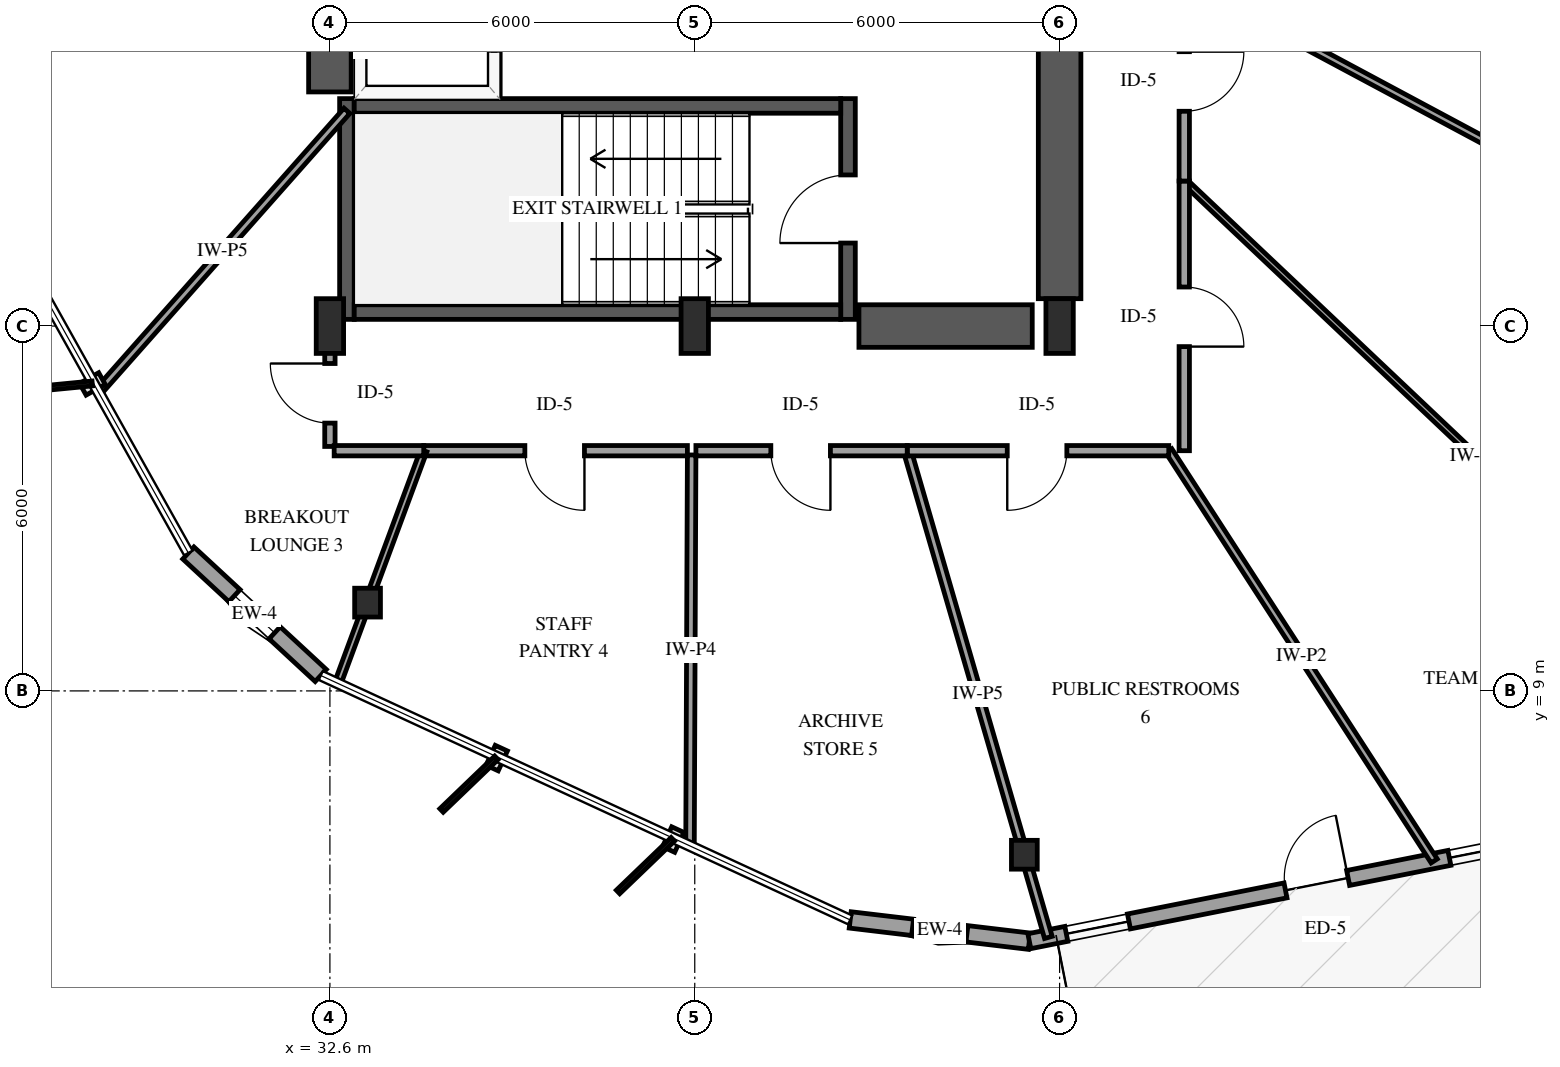
"""IFC4 building model, lengths in metres.
Left out: names, types, materials, properties, quantities, classifications, styles, units other than length and angle.
Written with IfcOpenShell. Run it as: python <this file> out.ifc"""

import sys

from ifc_helpers import new_model, si_unit, direction, frame, frame_2d, origin, origin_2d, place, context, subcontext, project, spatial, rectangle, i_section, extrude, element, fill, save


model = new_model("IFC4")
c1 = context("Model", 3, precision=1e-05, world=origin(), true_north=direction((0.0, 1.0)))
c2 = subcontext(c1, "Body", "Model", "MODEL_VIEW")
j1 = project(units=[si_unit("LENGTHUNIT", "METRE"), si_unit("PLANEANGLEUNIT", "RADIAN")], contexts=[c1])
p1 = place(None, origin())
s1 = spatial("IfcSite", under=j1, at=p1, CompositionType="ELEMENT")
p2 = place(p1, origin())
s2 = spatial("IfcBuilding", under=s1, at=p2, CompositionType="ELEMENT")
p3 = place(p2, frame((0.0, 0.0, 70.6)))
s3 = spatial("IfcBuildingStorey", under=s2, at=p3, CompositionType="ELEMENT", Elevation=70.6)
p4 = place(p3, frame((32.88, 15.11, 0.0), z_axis=(0.0, 0.0, 1.0), x_axis=(0.0, 1.0, 0.0)))
e1 = element("IfcWall", 1, at=p4, inside=s3, PredefinedType="SHEAR", context=c2, shape_type="SweptSolid", body=[
    extrude(rectangle(XDim=3.63, YDim=0.24, at=frame_2d((1.815, 0.0))), origin(), (0.0, 0.0, 1.0), 4.0),
])
p5 = place(p3, frame((41.12, 15.11, 0.0), z_axis=(0.0, 0.0, 1.0), x_axis=(0.0, 1.0, 0.0)))
e2 = element("IfcWall", 2, at=p5, inside=s3, PredefinedType="SHEAR", context=c2, shape_type="SweptSolid", body=[
    extrude(rectangle(XDim=3.63, YDim=0.24, at=frame_2d((1.815, 0.0))), origin(), (0.0, 0.0, 1.0), 4.0),
])
p6 = place(p5, frame((1.255, 0.0, 0.0)))
e3 = element("IfcOpeningElement", 3, at=p6, cuts=e2, PredefinedType="OPENING", context=c2, shape_type="SweptSolid", body=[
    extrude(rectangle(XDim=1.12, YDim=2.15, at=frame_2d((0.56, 1.075))), frame((0.0, 0.13, 0.0), z_axis=(0.0, -1.0, 0.0), x_axis=(1.0, 0.0, 0.0)), (0.0, 0.0, 1.0), 0.26),
])
for number, where, z_axis, x_axis in (
    (4, (33.0, 15.23, 0.0), (0.0, 0.0, 1.0), (1.0, 0.0, 0.0)),
    (5, (33.0, 18.62, 0.0), (0.0, 0.0, 1.0), (1.0, 0.0, 0.0)),
):
    element("IfcWall", number, at=place(p3, frame(where, z_axis=z_axis, x_axis=x_axis)), inside=s3, PredefinedType="SHEAR", context=c2, shape_type="SweptSolid", body=[
        extrude(rectangle(XDim=8.0, YDim=0.24, at=frame_2d((4.0, 0.0))), origin(), (0.0, 0.0, 1.0), 4.0),
    ])
p7 = place(p3, frame((32.6, 18.85, 0.0), z_axis=(0.0, 0.0, 1.0), x_axis=(0.0, 1.0, 0.0)))
e6 = element("IfcWall", 6, at=p7, inside=s3, PredefinedType="SHEAR", context=c2, shape_type="SweptSolid", body=[
    extrude(rectangle(XDim=12.3, YDim=0.7, at=frame_2d((6.15, 0.0))), origin(), (0.0, 0.0, 1.0), 4.0),
])
p8 = place(p3, frame((41.3, 15.0, 0.0), z_axis=(0.0, 0.0, 1.0), x_axis=(1.0, 0.0, 0.0)))
e7 = element("IfcWall", 7, at=p8, inside=s3, PredefinedType="SHEAR", context=c2, shape_type="SweptSolid", body=[
    extrude(rectangle(XDim=2.85, YDim=0.7, at=frame_2d((1.425, 0.0))), origin(), (0.0, 0.0, 1.0), 4.0),
])
p9 = place(p3, frame((44.6, 15.45, 0.0), z_axis=(0.0, 0.0, 1.0), x_axis=(0.0, 1.0, 0.0)))
e8 = element("IfcWall", 8, at=p9, inside=s3, PredefinedType="SHEAR", context=c2, shape_type="SweptSolid", body=[
    extrude(rectangle(XDim=6.35, YDim=0.7, at=frame_2d((3.175, 0.0))), origin(), (0.0, 0.0, 1.0), 4.0),
])
for number, where, z_axis, x_axis in (
    (9, (32.6, 15.0, 0.0), (0.0, 0.0, 1.0), (1.0, 0.0, 0.0)),
    (10, (38.6, 15.0, 0.0), (0.0, 0.0, 1.0), (1.0, 0.0, 0.0)),
    (11, (44.6, 15.0, 0.0), (0.0, 0.0, 1.0), (1.0, 0.0, 0.0)),
):
    element("IfcColumn", number, at=place(p3, frame(where, z_axis=z_axis, x_axis=x_axis)), inside=s3, PredefinedType="PILASTER", context=c2, shape_type="SweptSolid", body=[
        extrude(rectangle(XDim=0.45, YDim=0.9, at=origin_2d()), origin(), (0.0, 0.0, 1.0), 4.0),
    ])
for number, where, z_axis, x_axis in (
    (12, (33.219, 10.452, 0.0), (0.0, 0.0, 1.0), (1.0, 0.0, 0.0)),
    (13, (44.02, 6.306, 0.0), (0.0, 0.0, 1.0), (1.0, 0.0, 0.0)),
):
    element("IfcColumn", number, at=place(p3, frame(where, z_axis=z_axis, x_axis=x_axis)), inside=s3, PredefinedType="COLUMN", context=c2, shape_type="SweptSolid", body=[
        extrude(i_section(OverallWidth=0.424, OverallDepth=0.474, WebThickness=0.048, FlangeThickness=0.077, FilletRadius=0.038, at=origin_2d()), origin(), (0.0, 0.0, 1.0), 4.0),
    ])
p10 = place(p3, frame((30.272, 11.268, 0.0), z_axis=(0.0, 0.0, 1.0), x_axis=(0.733979438108, -0.679171689954, 0.0)))
e14 = element("IfcWall", 14, at=p10, inside=s3, PredefinedType="SOLIDWALL", context=c2, shape_type="SweptSolid", body=[
    extrude(rectangle(XDim=2.967, YDim=0.27, at=frame_2d((1.483, 0.0))), origin(), (0.0, 0.0, 1.0), 3.079),
])
p11 = place(p10, frame((1.033, 0.0, 0.75)))
e15 = element("IfcOpeningElement", 15, at=p11, cuts=e14, PredefinedType="OPENING", context=c2, shape_type="SweptSolid", body=[
    extrude(rectangle(XDim=0.9, YDim=1.5, at=frame_2d((0.45, 0.75))), frame((0.0, 0.145, 0.0), z_axis=(0.0, -1.0, 0.0), x_axis=(1.0, 0.0, 0.0)), (0.0, 0.0, 1.0), 0.29),
])
p12 = place(p3, frame((41.156, 5.234, 0.0), z_axis=(0.0, 0.0, 1.0), x_axis=(0.993011715875, -0.118015813075, 0.0)))
e16 = element("IfcWall", 16, at=p12, inside=s3, PredefinedType="SOLIDWALL", context=c2, shape_type="SweptSolid", body=[
    extrude(rectangle(XDim=2.967, YDim=0.27, at=frame_2d((1.483, 0.0))), origin(), (0.0, 0.0, 1.0), 3.079),
])
p13 = place(p12, frame((1.033, 0.0, 0.75)))
e17 = element("IfcOpeningElement", 17, at=p13, cuts=e16, PredefinedType="OPENING", context=c2, shape_type="SweptSolid", body=[
    extrude(rectangle(XDim=0.9, YDim=1.5, at=frame_2d((0.45, 0.75))), frame((0.0, 0.145, 0.0), z_axis=(0.0, -1.0, 0.0), x_axis=(1.0, 0.0, 0.0)), (0.0, 0.0, 1.0), 0.29),
])
p14 = place(p3, frame((44.102, 4.884, 0.0), z_axis=(0.0, 0.0, 1.0), x_axis=(0.980886929862, 0.194578598067, 0.0)))
e18 = element("IfcWall", 18, at=p14, inside=s3, PredefinedType="SOLIDWALL", context=c2, shape_type="SweptSolid", body=[
    extrude(rectangle(XDim=9.59, YDim=0.25, at=frame_2d((4.795, 0.0))), origin(), (0.0, 0.0, 1.0), 3.079),
])
p15 = place(p14, frame((4.295, 0.0, 0.0)))
e19 = element("IfcOpeningElement", 19, at=p15, cuts=e18, PredefinedType="OPENING", context=c2, shape_type="SweptSolid", body=[
    extrude(rectangle(XDim=1.05, YDim=2.15, at=frame_2d((0.525, 1.075))), frame((0.0, 0.135, 0.0), z_axis=(0.0, -1.0, 0.0), x_axis=(1.0, 0.0, 0.0)), (0.0, 0.0, 1.0), 0.27),
])
p16 = place(p14, frame((0.62, 0.0, 0.72)))
e20 = element("IfcOpeningElement", 20, at=p16, cuts=e18, PredefinedType="OPENING", context=c2, shape_type="SweptSolid", body=[
    extrude(rectangle(XDim=1.05, YDim=1.55, at=frame_2d((0.525, 0.775))), frame((0.0, 0.135, 0.0), z_axis=(0.0, -1.0, 0.0), x_axis=(1.0, 0.0, 0.0)), (0.0, 0.0, 1.0), 0.27),
])
p17 = place(p14, frame((7.042, 0.0, 0.72)))
e21 = element("IfcOpeningElement", 21, at=p17, cuts=e18, PredefinedType="OPENING", context=c2, shape_type="SweptSolid", body=[
    extrude(rectangle(XDim=1.05, YDim=1.55, at=frame_2d((0.525, 0.775))), frame((0.0, 0.135, 0.0), z_axis=(0.0, -1.0, 0.0), x_axis=(1.0, 0.0, 0.0)), (0.0, 0.0, 1.0), 0.27),
])
p18 = place(p3, frame((35.3, 18.79, 0.0), z_axis=(0.0, 0.0, 1.0), x_axis=(0.0, 1.0, 0.0)))
e22 = element("IfcWall", 22, at=p18, inside=s3, PredefinedType="SOLIDWALL", context=c2, shape_type="SweptSolid", body=[
    extrude(rectangle(XDim=2.55, YDim=0.2, at=frame_2d((1.275, 0.0))), origin(), (0.0, 0.0, 1.0), 3.7),
])
p19 = place(p18, frame((0.725, 0.0, 0.0)))
e23 = element("IfcOpeningElement", 23, at=p19, cuts=e22, PredefinedType="OPENING", context=c2, shape_type="SweptSolid", body=[
    extrude(rectangle(XDim=1.1, YDim=2.15, at=frame_2d((0.55, 1.075))), frame((0.0, 0.11, 0.0), z_axis=(0.0, -1.0, 0.0), x_axis=(1.0, 0.0, 0.0)), (0.0, 0.0, 1.0), 0.22),
])
p20 = place(p3, frame((46.65, 22.738, 0.0), z_axis=(0.0, 0.0, 1.0), x_axis=(0.96273671491, -0.270440414443, 0.0)))
e24 = element("IfcWall", 24, at=p20, inside=s3, PredefinedType="PARTITIONING", context=c2, shape_type="SweptSolid", body=[
    extrude(rectangle(XDim=17.864, YDim=0.14, at=frame_2d((8.932, 0.0))), origin(), (0.0, 0.0, 1.0), 2.995),
])
p21 = place(p3, frame((46.65, 20.689, 0.0), z_axis=(0.0, 0.0, 1.0), x_axis=(0.881590875685, -0.472014330194, 0.0)))
e25 = element("IfcWall", 25, at=p21, inside=s3, PredefinedType="PARTITIONING", context=c2, shape_type="SweptSolid", body=[
    extrude(rectangle(XDim=15.934, YDim=0.12, at=frame_2d((7.967, 0.0))), origin(), (0.0, 0.0, 1.0), 3.7),
])
p22 = place(p3, frame((46.65, 17.385, 0.0), z_axis=(0.0, 0.0, 1.0), x_axis=(0.726386402193, -0.687286544834, 0.0)))
e26 = element("IfcWall", 26, at=p22, inside=s3, PredefinedType="PARTITIONING", context=c2, shape_type="SweptSolid", body=[
    extrude(rectangle(XDim=13.175, YDim=0.1, at=frame_2d((6.587, 0.0))), origin(), (0.0, 0.0, 1.0), 2.995),
])
p23 = place(p3, frame((42.094, 12.95, 0.0), z_axis=(0.0, 0.0, 1.0), x_axis=(0.278514721912, -0.960431959942, 0.0)))
e27 = element("IfcWall", 27, at=p23, inside=s3, PredefinedType="PARTITIONING", context=c2, shape_type="SweptSolid", body=[
    extrude(rectangle(XDim=8.334, YDim=0.13, at=frame_2d((4.167, 0.0))), origin(), (0.0, 0.0, 1.0), 2.995),
])
p24 = place(p3, frame((46.395, 12.95, 0.0), z_axis=(0.0, 0.0, 1.0), x_axis=(0.543253797888, -0.839568526733, 0.0)))
e28 = element("IfcWall", 28, at=p24, inside=s3, PredefinedType="PARTITIONING", context=c2, shape_type="SweptSolid", body=[
    extrude(rectangle(XDim=8.035, YDim=0.12, at=frame_2d((4.018, 0.0))), origin(), (0.0, 0.0, 1.0), 3.7),
])
p25 = place(p3, frame((38.549, 12.88, 0.0), z_axis=(0.0, 0.0, 1.0), x_axis=(-0.004214565599, -0.999991118679, 0.0)))
e29 = element("IfcWall", 29, at=p25, inside=s3, PredefinedType="PARTITIONING", context=c2, shape_type="SweptSolid", body=[
    extrude(rectangle(XDim=6.43, YDim=0.14, at=frame_2d((3.215, 0.0))), origin(), (0.0, 0.0, 1.0), 3.7),
])
p26 = place(p3, frame((32.88, 18.54, 0.0), z_axis=(0.0, 0.0, 1.0), x_axis=(-0.66291868368, -0.74869140427, 0.0)))
e30 = element("IfcWall", 30, at=p26, inside=s3, PredefinedType="PARTITIONING", context=c2, shape_type="SweptSolid", body=[
    extrude(rectangle(XDim=6.171, YDim=0.13, at=frame_2d((3.085, 0.0))), origin(), (0.0, 0.0, 1.0), 3.7),
])
p27 = place(p3, frame((46.65, 17.385, 0.0), z_axis=(0.0, 0.0, 1.0), x_axis=(0.0, -1.0, 0.0)))
e31 = element("IfcWall", 31, at=p27, inside=s3, PredefinedType="PARTITIONING", context=c2, shape_type="SweptSolid", body=[
    extrude(rectangle(XDim=4.435, YDim=0.17, at=frame_2d((2.218, 0.0))), origin(), (0.0, 0.0, 1.0), 3.7),
])
p28 = place(p27, frame((1.743, 0.0, 0.0)))
e32 = element("IfcOpeningElement", 32, at=p28, cuts=e31, PredefinedType="OPENING", context=c2, shape_type="SweptSolid", body=[
    extrude(rectangle(XDim=0.98, YDim=2.15, at=frame_2d((0.49, 1.075))), frame((0.0, 0.095, 0.0), z_axis=(0.0, -1.0, 0.0), x_axis=(1.0, 0.0, 0.0)), (0.0, 0.0, 1.0), 0.19),
])
p29 = place(p3, frame((38.479, 12.95, 0.0), z_axis=(0.0, 0.0, 1.0), x_axis=(-1.0, 0.0, 0.0)))
e33 = element("IfcWall", 33, at=p29, inside=s3, PredefinedType="PARTITIONING", context=c2, shape_type="SweptSolid", body=[
    extrude(rectangle(XDim=4.336, YDim=0.17, at=frame_2d((2.168, 0.0))), origin(), (0.0, 0.0, 1.0), 3.7),
])
p30 = place(p29, frame((1.693, 0.0, 0.0)))
e34 = element("IfcOpeningElement", 34, at=p30, cuts=e33, PredefinedType="OPENING", context=c2, shape_type="SweptSolid", body=[
    extrude(rectangle(XDim=0.98, YDim=2.15, at=frame_2d((0.49, 1.075))), frame((0.0, 0.095, 0.0), z_axis=(0.0, -1.0, 0.0), x_axis=(1.0, 0.0, 0.0)), (0.0, 0.0, 1.0), 0.19),
])
p31 = place(p3, frame((46.395, 12.95, 0.0), z_axis=(0.0, 0.0, 1.0), x_axis=(-1.0, 0.0, 0.0)))
e35 = element("IfcWall", 35, at=p31, inside=s3, PredefinedType="PARTITIONING", context=c2, shape_type="SweptSolid", body=[
    extrude(rectangle(XDim=4.301, YDim=0.17, at=frame_2d((2.15, 0.0))), origin(), (0.0, 0.0, 1.0), 3.7),
])
p32 = place(p31, frame((1.676, 0.0, 0.0)))
e36 = element("IfcOpeningElement", 36, at=p32, cuts=e35, PredefinedType="OPENING", context=c2, shape_type="SweptSolid", body=[
    extrude(rectangle(XDim=0.98, YDim=2.15, at=frame_2d((0.49, 1.075))), frame((0.0, 0.095, 0.0), z_axis=(0.0, -1.0, 0.0), x_axis=(1.0, 0.0, 0.0)), (0.0, 0.0, 1.0), 0.19),
])
p33 = place(p3, frame((34.143, 12.95, 0.0), z_axis=(0.0, 0.0, 1.0), x_axis=(-0.346967284167, -0.937877232754, 0.0)))
e37 = element("IfcWall", 37, at=p33, inside=s3, PredefinedType="PARTITIONING", context=c2, shape_type="SweptSolid", body=[
    extrude(rectangle(XDim=4.078, YDim=0.11, at=frame_2d((2.039, 0.0))), origin(), (0.0, 0.0, 1.0), 2.995),
])
p34 = place(p3, frame((42.094, 12.95, 0.0), z_axis=(0.0, 0.0, 1.0), x_axis=(-1.0, 0.0, 0.0)))
e38 = element("IfcWall", 38, at=p34, inside=s3, PredefinedType="PARTITIONING", context=c2, shape_type="SweptSolid", body=[
    extrude(rectangle(XDim=3.475, YDim=0.17, at=frame_2d((1.738, 0.0))), origin(), (0.0, 0.0, 1.0), 3.7),
])
p35 = place(p34, frame((1.263, 0.0, 0.0)))
e39 = element("IfcOpeningElement", 39, at=p35, cuts=e38, PredefinedType="OPENING", context=c2, shape_type="SweptSolid", body=[
    extrude(rectangle(XDim=0.98, YDim=2.15, at=frame_2d((0.49, 1.075))), frame((0.0, 0.095, 0.0), z_axis=(0.0, -1.0, 0.0), x_axis=(1.0, 0.0, 0.0)), (0.0, 0.0, 1.0), 0.19),
])
p36 = place(p3, frame((46.65, 20.689, 0.0), z_axis=(0.0, 0.0, 1.0), x_axis=(0.0, -1.0, 0.0)))
e40 = element("IfcWall", 40, at=p36, inside=s3, PredefinedType="PARTITIONING", context=c2, shape_type="SweptSolid", body=[
    extrude(rectangle(XDim=3.304, YDim=0.17, at=frame_2d((1.652, 0.0))), origin(), (0.0, 0.0, 1.0), 3.7),
])
p37 = place(p36, frame((1.177, 0.0, 0.0)))
e41 = element("IfcOpeningElement", 41, at=p37, cuts=e40, PredefinedType="OPENING", context=c2, shape_type="SweptSolid", body=[
    extrude(rectangle(XDim=0.98, YDim=2.15, at=frame_2d((0.49, 1.075))), frame((0.0, 0.095, 0.0), z_axis=(0.0, -1.0, 0.0), x_axis=(1.0, 0.0, 0.0)), (0.0, 0.0, 1.0), 0.19),
])
p38 = place(p3, frame((32.6, 13.02, 0.0), z_axis=(0.0, 0.0, 1.0), x_axis=(0.0, 1.0, 0.0)))
e42 = element("IfcWall", 42, at=p38, inside=s3, PredefinedType="PARTITIONING", context=c2, shape_type="SweptSolid", body=[
    extrude(rectangle(XDim=1.91, YDim=0.17, at=frame_2d((0.955, 0.0))), origin(), (0.0, 0.0, 1.0), 3.7),
])
p39 = place(p38, frame((0.384, 0.0, 0.0)))
e43 = element("IfcOpeningElement", 43, at=p39, cuts=e42, PredefinedType="OPENING", context=c2, shape_type="SweptSolid", body=[
    extrude(rectangle(XDim=0.98, YDim=2.15, at=frame_2d((0.49, 1.075))), frame((0.0, 0.095, 0.0), z_axis=(0.0, -1.0, 0.0), x_axis=(1.0, 0.0, 0.0)), (0.0, 0.0, 1.0), 0.19),
])
p40 = place(p3, frame((34.143, 12.95, 0.0), z_axis=(0.0, 0.0, 1.0), x_axis=(-1.0, 0.0, 0.0)))
e44 = element("IfcWall", 44, at=p40, inside=s3, PredefinedType="PARTITIONING", context=c2, shape_type="SweptSolid", body=[
    extrude(rectangle(XDim=1.473, YDim=0.17, at=frame_2d((0.737, 0.0))), origin(), (0.0, 0.0, 1.0), 3.7),
])
p41 = place(p11, origin())
e45 = element("IfcWindow", 45, at=p41, inside=s3, PartitioningType="SINGLE_PANEL", PredefinedType="WINDOW", context=c2, shape_type="SweptSolid", body=[
    extrude(rectangle(XDim=0.9, YDim=1.5, at=frame_2d((0.45, 0.75))), frame((0.0, 0.03, 0.0), z_axis=(0.0, -1.0, 0.0), x_axis=(1.0, 0.0, 0.0)), (0.0, 0.0, 1.0), 0.06),
])
fill(e15, e45)
p42 = place(p13, origin())
e46 = element("IfcWindow", 46, at=p42, inside=s3, PartitioningType="SINGLE_PANEL", PredefinedType="WINDOW", context=c2, shape_type="SweptSolid", body=[
    extrude(rectangle(XDim=0.9, YDim=1.5, at=frame_2d((0.45, 0.75))), frame((0.0, 0.03, 0.0), z_axis=(0.0, -1.0, 0.0), x_axis=(1.0, 0.0, 0.0)), (0.0, 0.0, 1.0), 0.06),
])
fill(e17, e46)
p43 = place(p15, origin())
e47 = element("IfcDoor", 47, at=p43, inside=s3, OperationType="SINGLE_SWING_RIGHT", PredefinedType="DOOR", context=c2, shape_type="SweptSolid", body=[
    extrude(rectangle(XDim=1.05, YDim=2.15, at=frame_2d((0.525, 1.075))), frame((0.0, 0.025, 0.0), z_axis=(0.0, -1.0, 0.0), x_axis=(1.0, 0.0, 0.0)), (0.0, 0.0, 1.0), 0.05),
])
fill(e19, e47)
p44 = place(p16, origin())
e48 = element("IfcWindow", 48, at=p44, inside=s3, PartitioningType="SINGLE_PANEL", PredefinedType="WINDOW", context=c2, shape_type="SweptSolid", body=[
    extrude(rectangle(XDim=1.05, YDim=1.55, at=frame_2d((0.525, 0.775))), frame((0.0, 0.03, 0.0), z_axis=(0.0, -1.0, 0.0), x_axis=(1.0, 0.0, 0.0)), (0.0, 0.0, 1.0), 0.06),
])
fill(e20, e48)
p45 = place(p17, origin())
e49 = element("IfcWindow", 49, at=p45, inside=s3, PartitioningType="SINGLE_PANEL", PredefinedType="WINDOW", context=c2, shape_type="SweptSolid", body=[
    extrude(rectangle(XDim=1.05, YDim=1.55, at=frame_2d((0.525, 0.775))), frame((0.0, 0.03, 0.0), z_axis=(0.0, -1.0, 0.0), x_axis=(1.0, 0.0, 0.0)), (0.0, 0.0, 1.0), 0.06),
])
fill(e21, e49)
p46 = place(p6, origin())
e50 = element("IfcDoor", 50, at=p46, inside=s3, OperationType="SINGLE_SWING_LEFT", PredefinedType="DOOR", context=c2, shape_type="SweptSolid", body=[
    extrude(rectangle(XDim=1.12, YDim=2.15, at=frame_2d((0.56, 1.075))), frame((0.0, 0.025, 0.0), z_axis=(0.0, -1.0, 0.0), x_axis=(1.0, 0.0, 0.0)), (0.0, 0.0, 1.0), 0.05),
])
fill(e3, e50)
p47 = place(p28, origin())
e51 = element("IfcDoor", 51, at=p47, inside=s3, OperationType="SINGLE_SWING_RIGHT", PredefinedType="DOOR", context=c2, shape_type="SweptSolid", body=[
    extrude(rectangle(XDim=0.98, YDim=2.15, at=frame_2d((0.49, 1.075))), frame((0.0, 0.025, 0.0), z_axis=(0.0, -1.0, 0.0), x_axis=(1.0, 0.0, 0.0)), (0.0, 0.0, 1.0), 0.05),
])
fill(e32, e51)
p48 = place(p30, origin())
e52 = element("IfcDoor", 52, at=p48, inside=s3, OperationType="SINGLE_SWING_LEFT", PredefinedType="DOOR", context=c2, shape_type="SweptSolid", body=[
    extrude(rectangle(XDim=0.98, YDim=2.15, at=frame_2d((0.49, 1.075))), frame((0.0, 0.025, 0.0), z_axis=(0.0, -1.0, 0.0), x_axis=(1.0, 0.0, 0.0)), (0.0, 0.0, 1.0), 0.05),
])
fill(e34, e52)
p49 = place(p32, origin())
e53 = element("IfcDoor", 53, at=p49, inside=s3, OperationType="SINGLE_SWING_RIGHT", PredefinedType="DOOR", context=c2, shape_type="SweptSolid", body=[
    extrude(rectangle(XDim=0.98, YDim=2.15, at=frame_2d((0.49, 1.075))), frame((0.0, 0.025, 0.0), z_axis=(0.0, -1.0, 0.0), x_axis=(1.0, 0.0, 0.0)), (0.0, 0.0, 1.0), 0.05),
])
fill(e36, e53)
p50 = place(p35, origin())
e54 = element("IfcDoor", 54, at=p50, inside=s3, OperationType="SINGLE_SWING_LEFT", PredefinedType="DOOR", context=c2, shape_type="SweptSolid", body=[
    extrude(rectangle(XDim=0.98, YDim=2.15, at=frame_2d((0.49, 1.075))), frame((0.0, 0.025, 0.0), z_axis=(0.0, -1.0, 0.0), x_axis=(1.0, 0.0, 0.0)), (0.0, 0.0, 1.0), 0.05),
])
fill(e39, e54)
p51 = place(p37, origin())
e55 = element("IfcDoor", 55, at=p51, inside=s3, OperationType="SINGLE_SWING_LEFT", PredefinedType="DOOR", context=c2, shape_type="SweptSolid", body=[
    extrude(rectangle(XDim=0.98, YDim=2.15, at=frame_2d((0.49, 1.075))), frame((0.0, 0.025, 0.0), z_axis=(0.0, -1.0, 0.0), x_axis=(1.0, 0.0, 0.0)), (0.0, 0.0, 1.0), 0.05),
])
fill(e41, e55)
p52 = place(p39, origin())
e56 = element("IfcDoor", 56, at=p52, inside=s3, OperationType="SINGLE_SWING_RIGHT", PredefinedType="DOOR", context=c2, shape_type="SweptSolid", body=[
    extrude(rectangle(XDim=0.98, YDim=2.15, at=frame_2d((0.49, 1.075))), frame((0.0, 0.025, 0.0), z_axis=(0.0, -1.0, 0.0), x_axis=(1.0, 0.0, 0.0)), (0.0, 0.0, 1.0), 0.05),
])
fill(e43, e56)
save(model, sys.argv[1])
